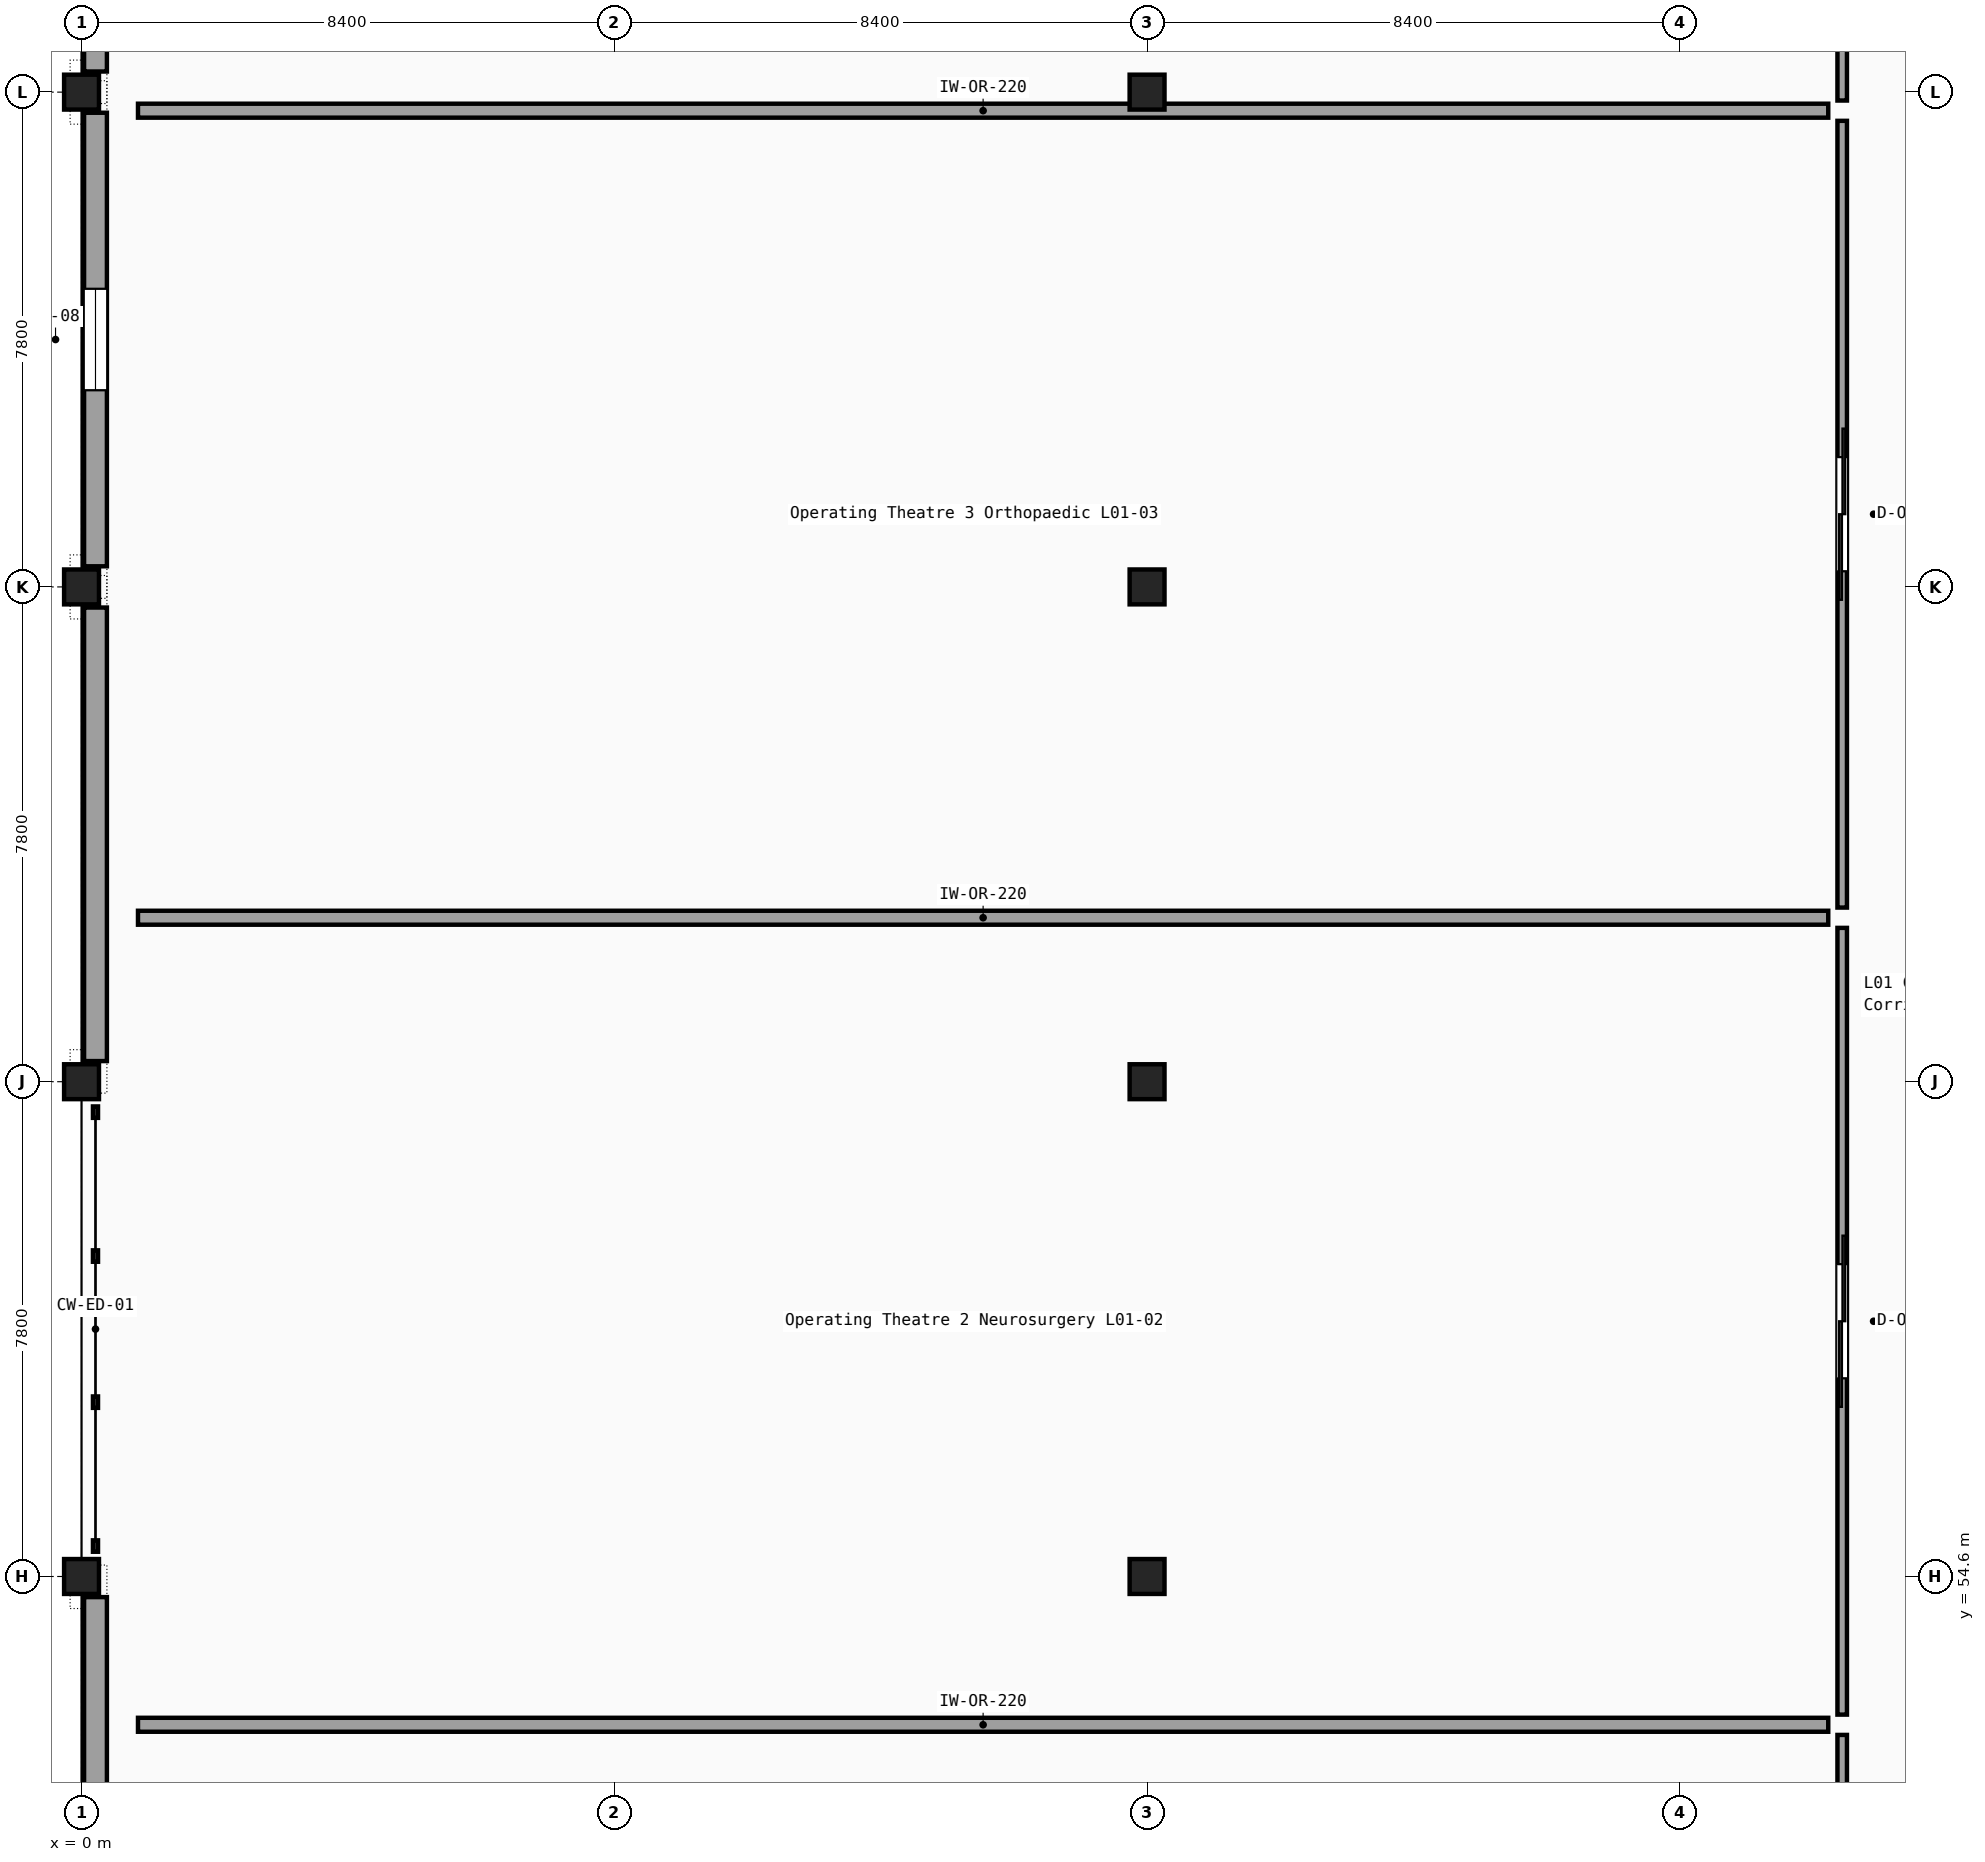
"""IFC4 building model, lengths in metres.
Left out: names, types, materials, properties, quantities, classifications, styles, units other than length and angle.
Written with IfcOpenShell. Run it as: python <this file> out.ifc"""

import sys

from ifc_helpers import new_model, si_unit, direction, frame, frame_2d, origin, origin_2d, place, context, subcontext, project, spatial, rectangle, i_section, extrude, element, fill, save


model = new_model("IFC4")
c1 = context("Model", 3, precision=1e-05, world=origin(), true_north=direction((0.0, 1.0)))
c2 = subcontext(c1, "Body", "Model", "MODEL_VIEW")
j1 = project(units=[si_unit("LENGTHUNIT", "METRE"), si_unit("PLANEANGLEUNIT", "RADIAN")], contexts=[c1])
p1 = place(None, origin())
s1 = spatial("IfcSite", under=j1, at=p1, CompositionType="ELEMENT")
p2 = place(p1, origin())
s2 = spatial("IfcBuilding", under=s1, at=p2, CompositionType="ELEMENT")
p3 = place(p2, frame((0.0, 0.0, 5.1)))
s3 = spatial("IfcBuildingStorey", under=s2, at=p3, CompositionType="ELEMENT", Elevation=5.1)
for number, where, z_axis, x_axis in (
    (1, (0.0, 54.6, 0.0), (0.0, 0.0, 1.0), (1.0, 0.0, 0.0)),
    (2, (0.0, 62.4, 0.0), (0.0, 0.0, 1.0), (1.0, 0.0, 0.0)),
    (3, (0.0, 70.2, 0.0), (0.0, 0.0, 1.0), (1.0, 0.0, 0.0)),
    (4, (0.0, 78.0, 0.0), (0.0, 0.0, 1.0), (1.0, 0.0, 0.0)),
    (5, (16.8, 54.6, 0.0), (0.0, 0.0, 1.0), (1.0, 0.0, 0.0)),
    (6, (16.8, 62.4, 0.0), (0.0, 0.0, 1.0), (1.0, 0.0, 0.0)),
    (7, (16.8, 70.2, 0.0), (0.0, 0.0, 1.0), (1.0, 0.0, 0.0)),
    (8, (16.8, 78.0, 0.0), (0.0, 0.0, 1.0), (1.0, 0.0, 0.0)),
):
    element("IfcColumn", number, at=place(p3, frame(where, z_axis=z_axis, x_axis=x_axis)), inside=s3, PredefinedType="COLUMN", context=c2, shape_type="SweptSolid", body=[
        extrude(i_section(OverallWidth=0.3, OverallDepth=0.55, WebThickness=0.015, FlangeThickness=0.029, FilletRadius=0.027, at=origin_2d()), origin(), (0.0, 0.0, 1.0), 5.1),
    ])
for number, where, z_axis, x_axis in (
    (9, (0.22, 47.125, 0.0), (0.0, 0.0, 1.0), (0.0, 1.0, 0.0)),
    (10, (0.22, 62.725, 0.0), (0.0, 0.0, 1.0), (0.0, 1.0, 0.0)),
):
    element("IfcWall", number, at=place(p3, frame(where, z_axis=z_axis, x_axis=x_axis)), inside=s3, PredefinedType="SOLIDWALL", context=c2, shape_type="SweptSolid", body=[
        extrude(rectangle(XDim=7.15, YDim=0.36, at=frame_2d((3.575, 0.0))), origin(), (0.0, 0.0, 1.0), 4.46),
    ])
p4 = place(p3, frame((0.22, 70.525, 0.0), z_axis=(0.0, 0.0, 1.0), x_axis=(0.0, 1.0, 0.0)))
e11 = element("IfcWall", 11, at=p4, inside=s3, PredefinedType="SOLIDWALL", context=c2, shape_type="SweptSolid", body=[
    extrude(rectangle(XDim=7.15, YDim=0.36, at=frame_2d((3.575, 0.0))), origin(), (0.0, 0.0, 1.0), 4.46),
])
p5 = place(p4, frame((2.775, 0.0, 1.15)))
e12 = element("IfcOpeningElement", 12, at=p5, cuts=e11, PredefinedType="OPENING", context=c2, shape_type="SweptSolid", body=[
    extrude(rectangle(XDim=1.6, YDim=1.3, at=frame_2d((0.8, 0.65))), frame((0.0, 0.19, 0.0), z_axis=(0.0, -1.0, 0.0), x_axis=(1.0, 0.0, 0.0)), (0.0, 0.0, 1.0), 0.38),
])
p6 = place(p3, frame((0.22, 78.325, 0.0), z_axis=(0.0, 0.0, 1.0), x_axis=(0.0, 1.0, 0.0)))
e13 = element("IfcWall", 13, at=p6, inside=s3, PredefinedType="SOLIDWALL", context=c2, shape_type="SweptSolid", body=[
    extrude(rectangle(XDim=7.15, YDim=0.36, at=frame_2d((3.575, 0.0))), origin(), (0.0, 0.0, 1.0), 4.46),
])
p7 = place(p3, frame((27.76, 39.62, 0.0), z_axis=(0.0, 0.0, 1.0), x_axis=(0.0, 1.0, 0.0)))
e14 = element("IfcWall", 14, at=p7, inside=s3, PredefinedType="PARTITIONING", context=c2, shape_type="SweptSolid", body=[
    extrude(rectangle(XDim=12.482, YDim=0.15, at=frame_2d((6.241, 0.0))), origin(), (0.0, 0.0, 1.0), 4.21),
])
p8 = place(p7, frame((5.341, 0.0, 0.0)))
e15 = element("IfcOpeningElement", 15, at=p8, cuts=e14, PredefinedType="OPENING", context=c2, shape_type="SweptSolid", body=[
    extrude(rectangle(XDim=1.8, YDim=2.4, at=frame_2d((0.9, 1.2))), frame((0.0, 0.085, 0.0), z_axis=(0.0, -1.0, 0.0), x_axis=(1.0, 0.0, 0.0)), (0.0, 0.0, 1.0), 0.17),
])
p9 = place(p3, frame((0.89, 52.262, 0.0), z_axis=(0.0, 0.0, 1.0), x_axis=(1.0, 0.0, 0.0)))
e16 = element("IfcWall", 16, at=p9, inside=s3, PredefinedType="PARTITIONING", context=c2, shape_type="SweptSolid", body=[
    extrude(rectangle(XDim=26.65, YDim=0.22, at=frame_2d((13.325, 0.0))), origin(), (0.0, 0.0, 1.0), 4.42),
])
p10 = place(p3, frame((27.76, 52.423, 0.0), z_axis=(0.0, 0.0, 1.0), x_axis=(0.0, 1.0, 0.0)))
e17 = element("IfcWall", 17, at=p10, inside=s3, PredefinedType="PARTITIONING", context=c2, shape_type="SweptSolid", body=[
    extrude(rectangle(XDim=12.402, YDim=0.15, at=frame_2d((6.201, 0.0))), origin(), (0.0, 0.0, 1.0), 4.27),
])
p11 = place(p10, frame((5.301, 0.0, 0.0)))
e18 = element("IfcOpeningElement", 18, at=p11, cuts=e17, PredefinedType="OPENING", context=c2, shape_type="SweptSolid", body=[
    extrude(rectangle(XDim=1.8, YDim=2.4, at=frame_2d((0.9, 1.2))), frame((0.0, 0.085, 0.0), z_axis=(0.0, -1.0, 0.0), x_axis=(1.0, 0.0, 0.0)), (0.0, 0.0, 1.0), 0.17),
])
p12 = place(p3, frame((0.89, 64.985, 0.0), z_axis=(0.0, 0.0, 1.0), x_axis=(1.0, 0.0, 0.0)))
e19 = element("IfcWall", 19, at=p12, inside=s3, PredefinedType="PARTITIONING", context=c2, shape_type="SweptSolid", body=[
    extrude(rectangle(XDim=26.65, YDim=0.22, at=frame_2d((13.325, 0.0))), origin(), (0.0, 0.0, 1.0), 4.42),
])
p13 = place(p3, frame((27.76, 65.145, 0.0), z_axis=(0.0, 0.0, 1.0), x_axis=(0.0, 1.0, 0.0)))
e20 = element("IfcWall", 20, at=p13, inside=s3, PredefinedType="PARTITIONING", context=c2, shape_type="SweptSolid", body=[
    extrude(rectangle(XDim=12.403, YDim=0.15, at=frame_2d((6.201, 0.0))), origin(), (0.0, 0.0, 1.0), 4.27),
])
p14 = place(p13, frame((5.301, 0.0, 0.0)))
e21 = element("IfcOpeningElement", 21, at=p14, cuts=e20, PredefinedType="OPENING", context=c2, shape_type="SweptSolid", body=[
    extrude(rectangle(XDim=1.8, YDim=2.4, at=frame_2d((0.9, 1.2))), frame((0.0, 0.085, 0.0), z_axis=(0.0, -1.0, 0.0), x_axis=(1.0, 0.0, 0.0)), (0.0, 0.0, 1.0), 0.17),
])
p15 = place(p3, frame((0.89, 77.708, 0.0), z_axis=(0.0, 0.0, 1.0), x_axis=(1.0, 0.0, 0.0)))
e22 = element("IfcWall", 22, at=p15, inside=s3, PredefinedType="PARTITIONING", context=c2, shape_type="SweptSolid", body=[
    extrude(rectangle(XDim=26.65, YDim=0.22, at=frame_2d((13.325, 0.0))), origin(), (0.0, 0.0, 1.0), 4.27),
])
p16 = place(p3, frame((27.76, 77.867, 0.0), z_axis=(0.0, 0.0, 1.0), x_axis=(0.0, 1.0, 0.0)))
e23 = element("IfcWall", 23, at=p16, inside=s3, PredefinedType="PARTITIONING", context=c2, shape_type="SweptSolid", body=[
    extrude(rectangle(XDim=12.483, YDim=0.15, at=frame_2d((6.241, 0.0))), origin(), (0.0, 0.0, 1.0), 4.27),
])
p17 = place(p16, frame((5.341, 0.0, 0.0)))
e24 = element("IfcOpeningElement", 24, at=p17, cuts=e23, PredefinedType="OPENING", context=c2, shape_type="SweptSolid", body=[
    extrude(rectangle(XDim=1.8, YDim=2.4, at=frame_2d((0.9, 1.2))), frame((0.0, 0.085, 0.0), z_axis=(0.0, -1.0, 0.0), x_axis=(1.0, 0.0, 0.0)), (0.0, 0.0, 1.0), 0.17),
])
p18 = place(p5, origin())
e25 = element("IfcWindow", 25, at=p18, inside=s3, PartitioningType="SINGLE_PANEL", PredefinedType="WINDOW", context=c2, shape_type="SweptSolid", body=[
    extrude(rectangle(XDim=1.6, YDim=1.3, at=frame_2d((0.8, 0.65))), frame((0.0, 0.03, 0.0), z_axis=(0.0, -1.0, 0.0), x_axis=(1.0, 0.0, 0.0)), (0.0, 0.0, 1.0), 0.06),
])
fill(e12, e25)
p19 = place(p11, origin())
e26 = element("IfcDoor", 26, at=p19, inside=s3, OperationType="DOUBLE_DOOR_SLIDING", PredefinedType="DOOR", context=c2, shape_type="SweptSolid", body=[
    extrude(rectangle(XDim=1.8, YDim=2.4, at=frame_2d((0.9, 1.2))), frame((0.0, 0.025, 0.0), z_axis=(0.0, -1.0, 0.0), x_axis=(1.0, 0.0, 0.0)), (0.0, 0.0, 1.0), 0.05),
])
fill(e18, e26)
p20 = place(p14, origin())
e27 = element("IfcDoor", 27, at=p20, inside=s3, OperationType="DOUBLE_DOOR_SLIDING", PredefinedType="DOOR", context=c2, shape_type="SweptSolid", body=[
    extrude(rectangle(XDim=1.8, YDim=2.4, at=frame_2d((0.9, 1.2))), frame((0.0, 0.025, 0.0), z_axis=(0.0, -1.0, 0.0), x_axis=(1.0, 0.0, 0.0)), (0.0, 0.0, 1.0), 0.05),
])
fill(e21, e27)
save(model, sys.argv[1])
